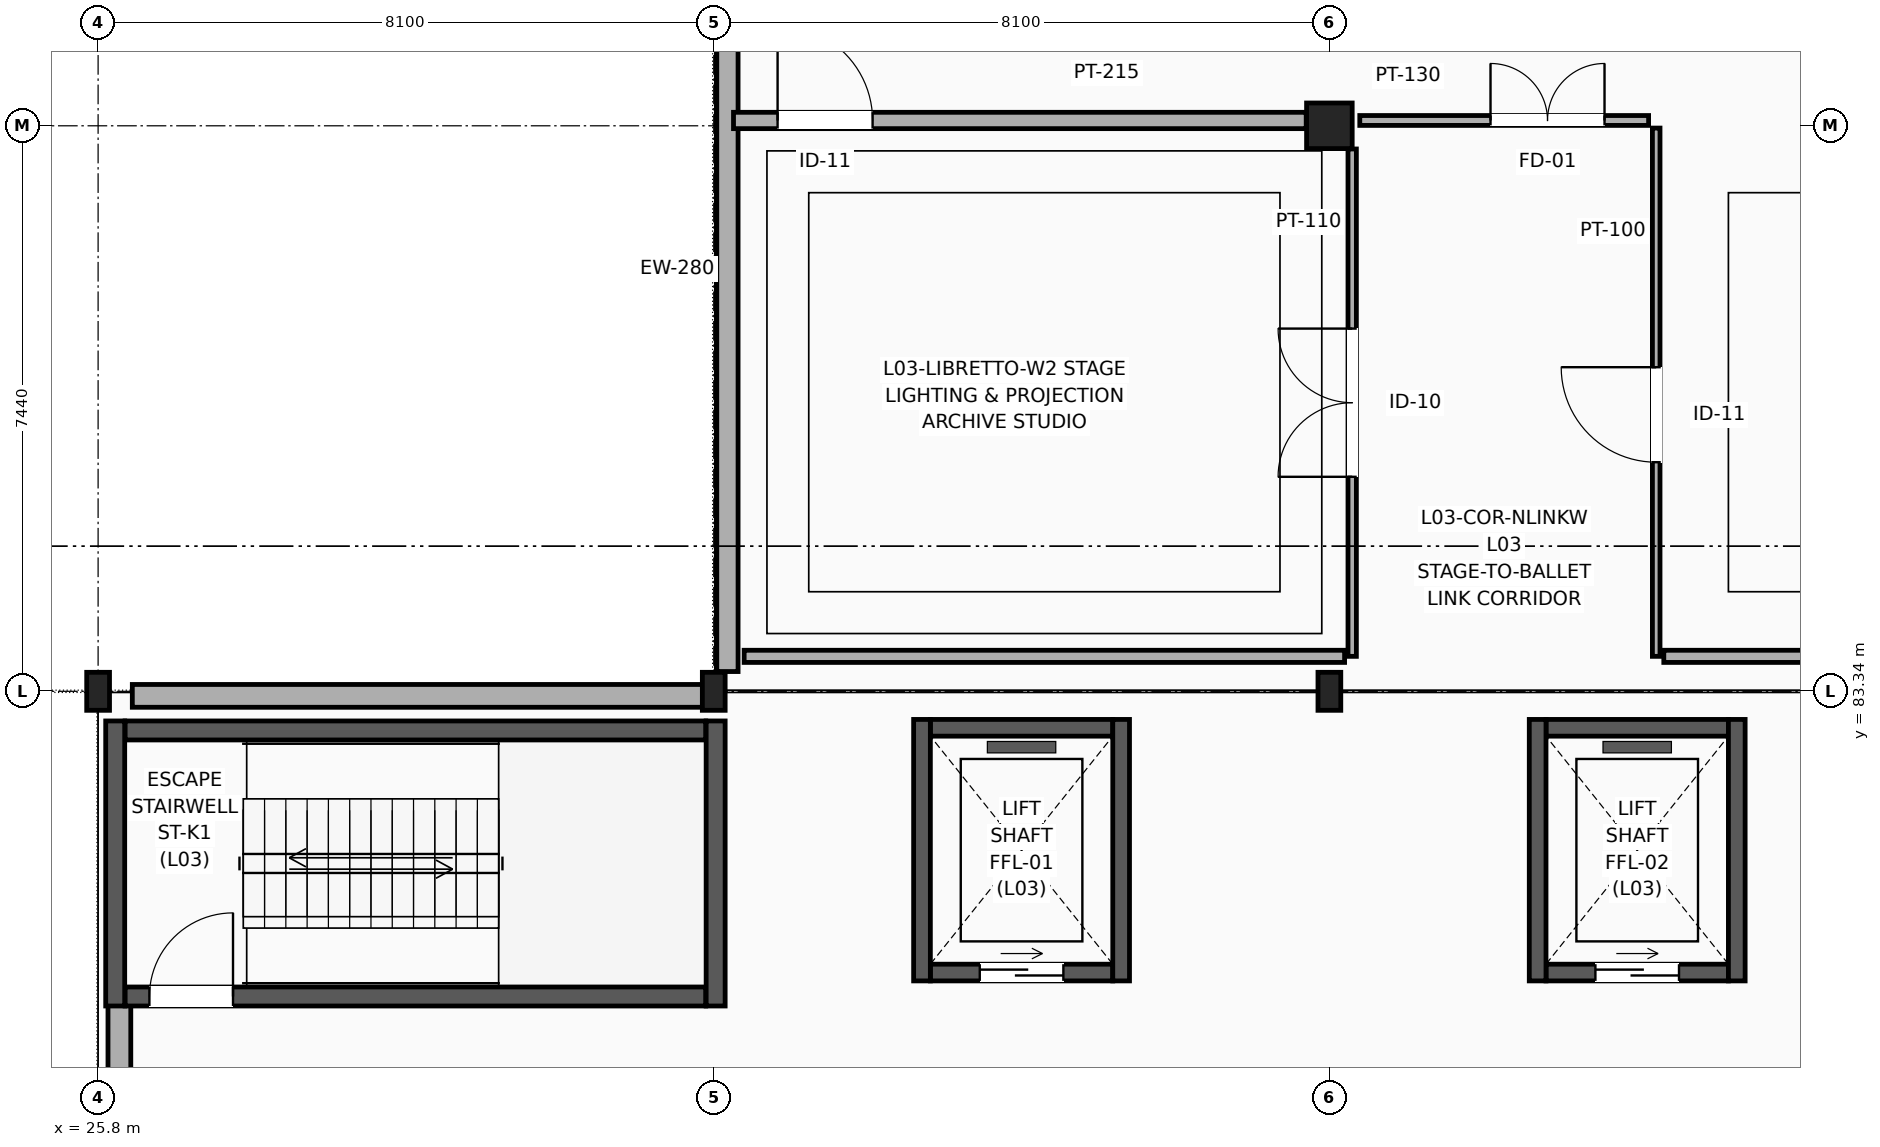
"""IFC4 building model, lengths in metres.
Left out: names, types, materials, properties, quantities, classifications, styles, units other than length and angle.
Written with IfcOpenShell. Run it as: python <this file> out.ifc"""

import sys

from ifc_helpers import new_model, si_unit, direction, frame, frame_2d, origin, origin_2d, place, context, subcontext, project, spatial, rectangle, i_section, extrude, element, fill, save


model = new_model("IFC4")
c1 = context("Model", 3, precision=1e-05, world=origin(), true_north=direction((0.0, 1.0)))
c2 = subcontext(c1, "Body", "Model", "MODEL_VIEW")
j1 = project(units=[si_unit("LENGTHUNIT", "METRE"), si_unit("PLANEANGLEUNIT", "RADIAN")], contexts=[c1])
p1 = place(None, origin())
s1 = spatial("IfcSite", under=j1, at=p1, CompositionType="ELEMENT")
p2 = place(p1, origin())
s2 = spatial("IfcBuilding", under=s1, at=p2, CompositionType="ELEMENT")
p3 = place(p2, frame((0.0, 0.0, 14.7)))
s3 = spatial("IfcBuildingStorey", under=s2, at=p3, CompositionType="ELEMENT", Elevation=14.7)
for number, where, z_axis, x_axis in (
    (1, (25.8, 83.34, 0.0), (0.0, 0.0, 1.0), (1.0, 0.0, 0.0)),
    (2, (33.9, 83.34, 0.0), (0.0, 0.0, 1.0), (1.0, 0.0, 0.0)),
    (3, (42.0, 83.34, 0.0), (0.0, 0.0, 1.0), (1.0, 0.0, 0.0)),
):
    element("IfcColumn", number, at=place(p3, frame(where, z_axis=z_axis, x_axis=x_axis)), inside=s3, PredefinedType="COLUMN", context=c2, shape_type="SweptSolid", body=[
        extrude(i_section(OverallWidth=0.3, OverallDepth=0.5, WebThickness=0.014, FlangeThickness=0.028, FilletRadius=0.027, at=origin_2d()), origin(), (0.0, 0.0, 1.0), 4.5),
    ])
p4 = place(p3, frame((42.0, 90.78, 0.0), z_axis=(0.0, 0.0, 1.0), x_axis=(1.0, 0.0, 0.0)))
e4 = element("IfcColumn", 4, at=p4, inside=s3, PredefinedType="COLUMN", context=c2, shape_type="SweptSolid", body=[
    extrude(rectangle(XDim=0.6, YDim=0.6, at=origin_2d()), origin(), (0.0, 0.0, 1.0), 4.5),
])
p5 = place(p3, frame((26.08, 61.35, 0.0), z_axis=(0.0, 0.0, 1.0), x_axis=(0.0, 1.0, 0.0)))
e5 = element("IfcWall", 5, at=p5, inside=s3, PredefinedType="SOLIDWALL", context=c2, shape_type="SweptSolid", body=[
    extrude(rectangle(XDim=17.95, YDim=0.3, at=frame_2d((8.975, 0.0))), origin(), (0.0, 0.0, 1.0), 3.625),
])
p6 = place(p3, frame((26.25, 83.28, 0.0), z_axis=(0.0, 0.0, 1.0), x_axis=(1.0, 0.0, 0.0)))
e6 = element("IfcWall", 6, at=p6, inside=s3, PredefinedType="SOLIDWALL", context=c2, shape_type="SweptSolid", body=[
    extrude(rectangle(XDim=7.55, YDim=0.3, at=frame_2d((3.775, 0.0))), origin(), (0.0, 0.0, 1.0), 3.625),
])
p7 = place(p3, frame((34.08, 83.6, 0.0), z_axis=(0.0, 0.0, 1.0), x_axis=(0.0, 1.0, 0.0)))
e7 = element("IfcWall", 7, at=p7, inside=s3, PredefinedType="SOLIDWALL", context=c2, shape_type="SweptSolid", body=[
    extrude(rectangle(XDim=10.6, YDim=0.28, at=frame_2d((5.3, 0.0))), origin(), (0.0, 0.0, 1.0), 4.225),
])
p8 = place(p3, frame((26.155, 79.325, 0.0), z_axis=(0.0, 0.0, 1.0), x_axis=(1.0, 0.0, 0.0)))
e8 = element("IfcWall", 8, at=p8, inside=s3, PredefinedType="SHEAR", context=c2, shape_type="SweptSolid", body=[
    extrude(rectangle(XDim=7.64, YDim=0.25, at=frame_2d((3.82, 0.0))), origin(), (0.0, 0.0, 1.0), 4.245),
])
p9 = place(p8, frame((0.32, 0.0, 0.0)))
e9 = element("IfcOpeningElement", 9, at=p9, cuts=e8, PredefinedType="OPENING", context=c2, shape_type="SweptSolid", body=[
    extrude(rectangle(XDim=1.1, YDim=2.2, at=frame_2d((0.55, 1.1))), frame((0.0, 0.135, 0.0), z_axis=(0.0, -1.0, 0.0), x_axis=(1.0, 0.0, 0.0)), (0.0, 0.0, 1.0), 0.27),
])
p10 = place(p3, frame((26.155, 82.825, 0.0), z_axis=(0.0, 0.0, 1.0), x_axis=(1.0, 0.0, 0.0)))
e10 = element("IfcWall", 10, at=p10, inside=s3, PredefinedType="SHEAR", context=c2, shape_type="SweptSolid", body=[
    extrude(rectangle(XDim=7.64, YDim=0.25, at=frame_2d((3.82, 0.0))), origin(), (0.0, 0.0, 1.0), 4.245),
])
for number, where, z_axis, x_axis in (
    (11, (26.025, 79.2, 0.0), (0.0, 0.0, 1.0), (0.0, 1.0, 0.0)),
    (12, (33.925, 79.2, 0.0), (0.0, 0.0, 1.0), (0.0, 1.0, 0.0)),
):
    element("IfcWall", number, at=place(p3, frame(where, z_axis=z_axis, x_axis=x_axis)), inside=s3, PredefinedType="SHEAR", context=c2, shape_type="SweptSolid", body=[
        extrude(rectangle(XDim=3.75, YDim=0.25, at=frame_2d((1.875, 0.0))), origin(), (0.0, 0.0, 1.0), 4.245),
    ])
p11 = place(p3, frame((36.75, 79.64, 0.0), z_axis=(0.0, 0.0, 1.0), x_axis=(1.0, 0.0, 0.0)))
e13 = element("IfcWall", 13, at=p11, inside=s3, PredefinedType="SOLIDWALL", context=c2, shape_type="SweptSolid", body=[
    extrude(rectangle(XDim=2.4, YDim=0.22, at=frame_2d((1.2, 0.0))), origin(), (0.0, 0.0, 1.0), 4.245),
])
p12 = place(p11, frame((0.65, 0.0, 0.0)))
e14 = element("IfcOpeningElement", 14, at=p12, cuts=e13, PredefinedType="OPENING", context=c2, shape_type="SweptSolid", body=[
    extrude(rectangle(XDim=1.1, YDim=2.2, at=frame_2d((0.55, 1.1))), frame((0.0, 0.12, 0.0), z_axis=(0.0, -1.0, 0.0), x_axis=(1.0, 0.0, 0.0)), (0.0, 0.0, 1.0), 0.24),
])
p13 = place(p3, frame((36.75, 82.86, 0.0), z_axis=(0.0, 0.0, 1.0), x_axis=(1.0, 0.0, 0.0)))
e15 = element("IfcWall", 15, at=p13, inside=s3, PredefinedType="SOLIDWALL", context=c2, shape_type="SweptSolid", body=[
    extrude(rectangle(XDim=2.4, YDim=0.22, at=frame_2d((1.2, 0.0))), origin(), (0.0, 0.0, 1.0), 4.245),
])
for number, where, z_axis, x_axis in (
    (16, (36.64, 79.53, 0.0), (0.0, 0.0, 1.0), (0.0, 1.0, 0.0)),
    (17, (39.26, 79.53, 0.0), (0.0, 0.0, 1.0), (0.0, 1.0, 0.0)),
):
    element("IfcWall", number, at=place(p3, frame(where, z_axis=z_axis, x_axis=x_axis)), inside=s3, PredefinedType="SOLIDWALL", context=c2, shape_type="SweptSolid", body=[
        extrude(rectangle(XDim=3.44, YDim=0.22, at=frame_2d((1.72, 0.0))), origin(), (0.0, 0.0, 1.0), 4.245),
    ])
p14 = place(p3, frame((44.85, 79.64, 0.0), z_axis=(0.0, 0.0, 1.0), x_axis=(1.0, 0.0, 0.0)))
e18 = element("IfcWall", 18, at=p14, inside=s3, PredefinedType="SOLIDWALL", context=c2, shape_type="SweptSolid", body=[
    extrude(rectangle(XDim=2.4, YDim=0.22, at=frame_2d((1.2, 0.0))), origin(), (0.0, 0.0, 1.0), 4.245),
])
p15 = place(p14, frame((0.65, 0.0, 0.0)))
e19 = element("IfcOpeningElement", 19, at=p15, cuts=e18, PredefinedType="OPENING", context=c2, shape_type="SweptSolid", body=[
    extrude(rectangle(XDim=1.1, YDim=2.2, at=frame_2d((0.55, 1.1))), frame((0.0, 0.12, 0.0), z_axis=(0.0, -1.0, 0.0), x_axis=(1.0, 0.0, 0.0)), (0.0, 0.0, 1.0), 0.24),
])
p16 = place(p3, frame((44.85, 82.86, 0.0), z_axis=(0.0, 0.0, 1.0), x_axis=(1.0, 0.0, 0.0)))
e20 = element("IfcWall", 20, at=p16, inside=s3, PredefinedType="SOLIDWALL", context=c2, shape_type="SweptSolid", body=[
    extrude(rectangle(XDim=2.4, YDim=0.22, at=frame_2d((1.2, 0.0))), origin(), (0.0, 0.0, 1.0), 4.245),
])
for number, where, z_axis, x_axis in (
    (21, (44.74, 79.53, 0.0), (0.0, 0.0, 1.0), (0.0, 1.0, 0.0)),
    (22, (47.36, 79.53, 0.0), (0.0, 0.0, 1.0), (0.0, 1.0, 0.0)),
):
    element("IfcWall", number, at=place(p3, frame(where, z_axis=z_axis, x_axis=x_axis)), inside=s3, PredefinedType="SOLIDWALL", context=c2, shape_type="SweptSolid", body=[
        extrude(rectangle(XDim=3.44, YDim=0.22, at=frame_2d((1.72, 0.0))), origin(), (0.0, 0.0, 1.0), 4.245),
    ])
p17 = place(p3, frame((42.4, 90.85, 0.0), z_axis=(0.0, 0.0, 1.0), x_axis=(1.0, 0.0, 0.0)))
e23 = element("IfcWall", 23, at=p17, inside=s3, PredefinedType="PARTITIONING", context=c2, shape_type="SweptSolid", body=[
    extrude(rectangle(XDim=3.8, YDim=0.13, at=frame_2d((1.9, 0.0))), origin(), (0.0, 0.0, 1.0), 3.427),
])
p18 = place(p17, frame((1.72, 0.0, 0.0)))
e24 = element("IfcOpeningElement", 24, at=p18, cuts=e23, PredefinedType="OPENING", context=c2, shape_type="SweptSolid", body=[
    extrude(rectangle(XDim=1.5, YDim=2.2, at=frame_2d((0.75, 1.1))), frame((0.0, 0.075, 0.0), z_axis=(0.0, -1.0, 0.0), x_axis=(1.0, 0.0, 0.0)), (0.0, 0.0, 1.0), 0.15),
])
p19 = place(p3, frame((42.3, 83.8, 0.0), z_axis=(0.0, 0.0, 1.0), x_axis=(0.0, 1.0, 0.0)))
e25 = element("IfcWall", 25, at=p19, inside=s3, PredefinedType="PARTITIONING", context=c2, shape_type="SweptSolid", body=[
    extrude(rectangle(XDim=6.675, YDim=0.11, at=frame_2d((3.337, 0.0))), origin(), (0.0, 0.0, 1.0), 4.225),
])
p20 = place(p19, frame((2.362, 0.0, 0.0)))
e26 = element("IfcOpeningElement", 26, at=p20, cuts=e25, PredefinedType="OPENING", context=c2, shape_type="SweptSolid", body=[
    extrude(rectangle(XDim=1.95, YDim=2.45, at=frame_2d((0.975, 1.225))), frame((0.0, 0.065, 0.0), z_axis=(0.0, -1.0, 0.0), x_axis=(1.0, 0.0, 0.0)), (0.0, 0.0, 1.0), 0.13),
])
p21 = place(p3, frame((46.3, 83.8, 0.0), z_axis=(0.0, 0.0, 1.0), x_axis=(0.0, 1.0, 0.0)))
e27 = element("IfcWall", 27, at=p21, inside=s3, PredefinedType="PARTITIONING", context=c2, shape_type="SweptSolid", body=[
    extrude(rectangle(XDim=6.95, YDim=0.1, at=frame_2d((3.475, 0.0))), origin(), (0.0, 0.0, 1.0), 3.427),
])
p22 = place(p21, frame((2.554, 0.0, 0.0)))
e28 = element("IfcOpeningElement", 28, at=p22, cuts=e27, PredefinedType="OPENING", context=c2, shape_type="SweptSolid", body=[
    extrude(rectangle(XDim=1.25, YDim=2.15, at=frame_2d((0.625, 1.075))), frame((0.0, 0.06, 0.0), z_axis=(0.0, -1.0, 0.0), x_axis=(1.0, 0.0, 0.0)), (0.0, 0.0, 1.0), 0.12),
])
p23 = place(p3, frame((34.16, 90.85, 0.0), z_axis=(0.0, 0.0, 1.0), x_axis=(1.0, 0.0, 0.0)))
e29 = element("IfcWall", 29, at=p23, inside=s3, PredefinedType="PARTITIONING", context=c2, shape_type="SweptSolid", body=[
    extrude(rectangle(XDim=7.535, YDim=0.215, at=frame_2d((3.768, 0.0))), origin(), (0.0, 0.0, 1.0), 4.225),
])
p24 = place(p23, frame((0.58, 0.0, 0.0)))
e30 = element("IfcOpeningElement", 30, at=p24, cuts=e29, PredefinedType="OPENING", context=c2, shape_type="SweptSolid", body=[
    extrude(rectangle(XDim=1.25, YDim=2.15, at=frame_2d((0.625, 1.075))), frame((0.0, 0.117, 0.0), z_axis=(0.0, -1.0, 0.0), x_axis=(1.0, 0.0, 0.0)), (0.0, 0.0, 1.0), 0.235),
])
p25 = place(p3, frame((34.3, 83.8, 0.0), z_axis=(0.0, 0.0, 1.0), x_axis=(1.0, 0.0, 0.0)))
e31 = element("IfcWall", 31, at=p25, inside=s3, PredefinedType="PARTITIONING", context=c2, shape_type="SweptSolid", body=[
    extrude(rectangle(XDim=7.9, YDim=0.16, at=frame_2d((3.95, 0.0))), origin(), (0.0, 0.0, 1.0), 3.577),
])
p26 = place(p3, frame((46.4, 83.8, 0.0), z_axis=(0.0, 0.0, 1.0), x_axis=(1.0, 0.0, 0.0)))
e32 = element("IfcWall", 32, at=p26, inside=s3, PredefinedType="PARTITIONING", context=c2, shape_type="SweptSolid", body=[
    extrude(rectangle(XDim=19.4, YDim=0.16, at=frame_2d((9.7, 0.0))), origin(), (0.0, 0.0, 1.0), 3.577),
])
p27 = place(p9, origin())
e33 = element("IfcDoor", 33, at=p27, inside=s3, OperationType="SINGLE_SWING_RIGHT", PredefinedType="DOOR", context=c2, shape_type="SweptSolid", body=[
    extrude(rectangle(XDim=1.1, YDim=2.2, at=frame_2d((0.55, 1.1))), frame((0.0, 0.025, 0.0), z_axis=(0.0, -1.0, 0.0), x_axis=(1.0, 0.0, 0.0)), (0.0, 0.0, 1.0), 0.05),
])
fill(e9, e33)
p28 = place(p12, origin())
e34 = element("IfcDoor", 34, at=p28, inside=s3, OperationType="SLIDING_TO_LEFT", PredefinedType="DOOR", context=c2, shape_type="SweptSolid", body=[
    extrude(rectangle(XDim=1.1, YDim=2.2, at=frame_2d((0.55, 1.1))), frame((0.0, 0.025, 0.0), z_axis=(0.0, -1.0, 0.0), x_axis=(1.0, 0.0, 0.0)), (0.0, 0.0, 1.0), 0.05),
])
fill(e14, e34)
p29 = place(p15, origin())
e35 = element("IfcDoor", 35, at=p29, inside=s3, OperationType="SLIDING_TO_LEFT", PredefinedType="DOOR", context=c2, shape_type="SweptSolid", body=[
    extrude(rectangle(XDim=1.1, YDim=2.2, at=frame_2d((0.55, 1.1))), frame((0.0, 0.025, 0.0), z_axis=(0.0, -1.0, 0.0), x_axis=(1.0, 0.0, 0.0)), (0.0, 0.0, 1.0), 0.05),
])
fill(e19, e35)
p30 = place(p18, origin())
e36 = element("IfcDoor", 36, at=p30, inside=s3, OperationType="DOUBLE_DOOR_SINGLE_SWING", PredefinedType="DOOR", context=c2, shape_type="SweptSolid", body=[
    extrude(rectangle(XDim=1.5, YDim=2.2, at=frame_2d((0.75, 1.1))), frame((0.0, 0.025, 0.0), z_axis=(0.0, -1.0, 0.0), x_axis=(1.0, 0.0, 0.0)), (0.0, 0.0, 1.0), 0.05),
])
fill(e24, e36)
p31 = place(p20, origin())
e37 = element("IfcDoor", 37, at=p31, inside=s3, OperationType="DOUBLE_DOOR_SINGLE_SWING", PredefinedType="DOOR", context=c2, shape_type="SweptSolid", body=[
    extrude(rectangle(XDim=1.95, YDim=2.45, at=frame_2d((0.975, 1.225))), frame((0.0, 0.025, 0.0), z_axis=(0.0, -1.0, 0.0), x_axis=(1.0, 0.0, 0.0)), (0.0, 0.0, 1.0), 0.05),
])
fill(e26, e37)
p32 = place(p22, origin())
e38 = element("IfcDoor", 38, at=p32, inside=s3, OperationType="SINGLE_SWING_RIGHT", PredefinedType="DOOR", context=c2, shape_type="SweptSolid", body=[
    extrude(rectangle(XDim=1.25, YDim=2.15, at=frame_2d((0.625, 1.075))), frame((0.0, 0.025, 0.0), z_axis=(0.0, -1.0, 0.0), x_axis=(1.0, 0.0, 0.0)), (0.0, 0.0, 1.0), 0.05),
])
fill(e28, e38)
p33 = place(p24, origin())
e39 = element("IfcDoor", 39, at=p33, inside=s3, OperationType="SINGLE_SWING_LEFT", PredefinedType="DOOR", context=c2, shape_type="SweptSolid", body=[
    extrude(rectangle(XDim=1.25, YDim=2.15, at=frame_2d((0.625, 1.075))), frame((0.0, 0.025, 0.0), z_axis=(0.0, -1.0, 0.0), x_axis=(1.0, 0.0, 0.0)), (0.0, 0.0, 1.0), 0.05),
])
fill(e30, e39)
save(model, sys.argv[1])
